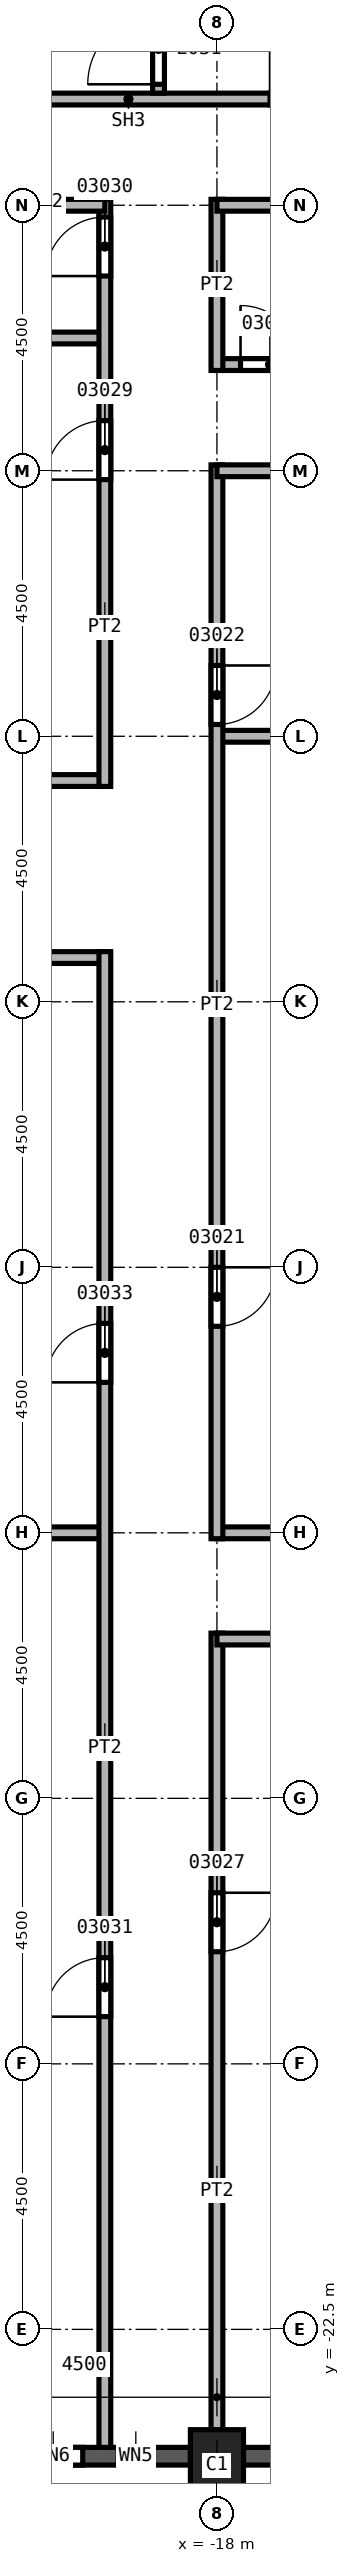
"""IFC4 building model, lengths in metres.
Left out: names, types, materials, properties, quantities, classifications, styles, units other than length and angle.
Written with IfcOpenShell. Run it as: python <this file> out.ifc"""

import sys

from ifc_helpers import new_model, si_unit, direction, frame, frame_2d, origin, origin_2d, place, context, subcontext, project, spatial, rectangle, extrude, element, fill, save


model = new_model("IFC4")
c1 = context("Model", 3, precision=1e-05, world=origin(), true_north=direction((0.0, 1.0)))
c2 = subcontext(c1, "Body", "Model", "MODEL_VIEW")
j1 = project(units=[si_unit("LENGTHUNIT", "METRE"), si_unit("PLANEANGLEUNIT", "RADIAN")], contexts=[c1])
p1 = place(None, origin())
s1 = spatial("IfcSite", under=j1, at=p1, CompositionType="ELEMENT")
p2 = place(p1, origin())
s2 = spatial("IfcBuilding", under=s1, at=p2, CompositionType="ELEMENT")
p3 = place(p2, frame((0.0, 0.0, 92.0)))
s3 = spatial("IfcBuildingStorey", under=s2, at=p3, CompositionType="ELEMENT", Elevation=92.0)
p4 = place(p3, frame((-18.0, -24.8, 0.0), z_axis=(0.0, 0.0, 1.0), x_axis=(1.0, 0.0, 0.0)))
e1 = element("IfcColumn", 1, at=p4, inside=s3, PredefinedType="COLUMN", context=c2, shape_type="SweptSolid", body=[
    extrude(rectangle(XDim=0.9, YDim=1.2, at=origin_2d()), origin(), (0.0, 0.0, 1.0), 3.7),
])
p5 = place(p3, frame((-22.05, -24.65, 0.0), z_axis=(0.0, 0.0, 1.0), x_axis=(1.0, 0.0, 0.0)))
e2 = element("IfcWall", 2, at=p5, inside=s3, PredefinedType="SOLIDWALL", context=c2, shape_type="SweptSolid", body=[
    extrude(rectangle(XDim=3.6, YDim=0.3, at=frame_2d((1.8, 0.0))), origin(), (0.0, 0.0, 1.0), 3.1),
])
p6 = place(p5, frame((0.775, 0.0, 0.8)))
e3 = element("IfcOpeningElement", 3, at=p6, cuts=e2, PredefinedType="OPENING", context=c2, shape_type="SweptSolid", body=[
    extrude(rectangle(XDim=1.0, YDim=1.95, at=frame_2d((0.5, 0.975))), frame((0.0, 0.15, 0.0), z_axis=(0.0, -1.0, 0.0), x_axis=(1.0, 0.0, 0.0)), (0.0, 0.0, 1.0), 0.3),
])
p7 = place(p5, frame((2.375, 0.0, 0.8)))
e4 = element("IfcOpeningElement", 4, at=p7, cuts=e2, PredefinedType="OPENING", context=c2, shape_type="SweptSolid", body=[
    extrude(rectangle(XDim=0.6, YDim=1.95, at=frame_2d((0.3, 0.975))), frame((0.0, 0.15, 0.0), z_axis=(0.0, -1.0, 0.0), x_axis=(1.0, 0.0, 0.0)), (0.0, 0.0, 1.0), 0.3),
])
p8 = place(p3, frame((-17.55, -24.65, 0.0), z_axis=(0.0, 0.0, 1.0), x_axis=(1.0, 0.0, 0.0)))
e5 = element("IfcWall", 5, at=p8, inside=s3, PredefinedType="SOLIDWALL", context=c2, shape_type="SweptSolid", body=[
    extrude(rectangle(XDim=3.6, YDim=0.3, at=frame_2d((1.8, 0.0))), origin(), (0.0, 0.0, 1.0), 3.1),
])
p9 = place(p8, frame((0.6, 0.0, 0.8)))
e6 = element("IfcOpeningElement", 6, at=p9, cuts=e5, PredefinedType="OPENING", context=c2, shape_type="SweptSolid", body=[
    extrude(rectangle(XDim=2.4, YDim=1.95, at=frame_2d((1.2, 0.975))), frame((0.0, 0.15, 0.0), z_axis=(0.0, -1.0, 0.0), x_axis=(1.0, 0.0, 0.0)), (0.0, 0.0, 1.0), 0.3),
])
p10 = place(p3, frame((-33.85, 3.75, 0.0), z_axis=(0.0, 0.0, 1.0), x_axis=(1.0, 0.0, 0.0)))
e7 = element("IfcWall", 7, at=p10, inside=s3, PredefinedType="PARTITIONING", context=c2, shape_type="SweptSolid", body=[
    extrude(rectangle(XDim=13.95, YDim=0.2, at=frame_2d((6.975, 0.0))), origin(), (0.0, 0.0, 1.0), 3.7),
])
p11 = place(p10, frame((5.65, 0.0, 0.0)))
e8 = element("IfcOpeningElement", 8, at=p11, cuts=e7, PredefinedType="OPENING", context=c2, shape_type="SweptSolid", body=[
    extrude(rectangle(XDim=1.0, YDim=2.1, at=frame_2d((0.5, 1.05))), frame((0.0, 0.1, 0.0), z_axis=(0.0, -1.0, 0.0), x_axis=(1.0, 0.0, 0.0)), (0.0, 0.0, 1.0), 0.2),
])
for number, where, z_axis, x_axis in (
    (9, (-27.1, -9.0, 0.0), (0.0, 0.0, 1.0), (1.0, 0.0, 0.0)),
    (10, (-27.1, 11.25, 0.0), (0.0, 0.0, 1.0), (1.0, 0.0, 0.0)),
):
    element("IfcWall", number, at=place(p3, frame(where, z_axis=z_axis, x_axis=x_axis)), inside=s3, PredefinedType="PARTITIONING", context=c2, shape_type="SweptSolid", body=[
        extrude(rectangle(XDim=7.2, YDim=0.2, at=frame_2d((3.6, 0.0))), origin(), (0.0, 0.0, 1.0), 3.7),
    ])
p12 = place(p3, frame((-19.9, 0.75, 0.0), z_axis=(0.0, 0.0, 1.0), x_axis=(-1.0, 0.0, 0.0)))
e11 = element("IfcWall", 11, at=p12, inside=s3, PredefinedType="PARTITIONING", context=c2, shape_type="SweptSolid", body=[
    extrude(rectangle(XDim=13.95, YDim=0.2, at=frame_2d((6.975, 0.0))), origin(), (0.0, 0.0, 1.0), 3.7),
])
p13 = place(p3, frame((-19.9, -24.5, 0.0), z_axis=(0.0, 0.0, 1.0), x_axis=(0.0, 1.0, 0.0)))
e12 = element("IfcWall", 12, at=p13, inside=s3, PredefinedType="PARTITIONING", context=c2, shape_type="SweptSolid", body=[
    extrude(rectangle(XDim=25.35, YDim=0.2, at=frame_2d((12.675, 0.0))), origin(), (0.0, 0.0, 1.0), 3.7),
])
p14 = place(p13, frame((7.3, 0.0, 0.0)))
e13 = element("IfcOpeningElement", 13, at=p14, cuts=e12, PredefinedType="OPENING", context=c2, shape_type="SweptSolid", body=[
    extrude(rectangle(XDim=1.0, YDim=2.1, at=frame_2d((0.5, 1.05))), frame((0.0, 0.1, 0.0), z_axis=(0.0, -1.0, 0.0), x_axis=(1.0, 0.0, 0.0)), (0.0, 0.0, 1.0), 0.2),
])
p15 = place(p13, frame((18.05, 0.0, 0.0)))
e14 = element("IfcOpeningElement", 14, at=p15, cuts=e12, PredefinedType="OPENING", context=c2, shape_type="SweptSolid", body=[
    extrude(rectangle(XDim=1.0, YDim=2.1, at=frame_2d((0.5, 1.05))), frame((0.0, 0.1, 0.0), z_axis=(0.0, -1.0, 0.0), x_axis=(1.0, 0.0, 0.0)), (0.0, 0.0, 1.0), 0.2),
])
p16 = place(p3, frame((-19.9, 3.65, 0.0), z_axis=(0.0, 0.0, 1.0), x_axis=(0.0, 1.0, 0.0)))
e15 = element("IfcWall", 15, at=p16, inside=s3, PredefinedType="PARTITIONING", context=c2, shape_type="SweptSolid", body=[
    extrude(rectangle(XDim=9.95, YDim=0.2, at=frame_2d((4.975, 0.0))), origin(), (0.0, 0.0, 1.0), 3.7),
])
p17 = place(p16, frame((5.2, 0.0, 0.0)))
e16 = element("IfcOpeningElement", 16, at=p17, cuts=e15, PredefinedType="OPENING", context=c2, shape_type="SweptSolid", body=[
    extrude(rectangle(XDim=1.0, YDim=2.1, at=frame_2d((0.5, 1.05))), frame((0.0, 0.1, 0.0), z_axis=(0.0, -1.0, 0.0), x_axis=(1.0, 0.0, 0.0)), (0.0, 0.0, 1.0), 0.2),
])
p18 = place(p16, frame((8.65, 0.0, 0.0)))
e17 = element("IfcOpeningElement", 17, at=p18, cuts=e15, PredefinedType="OPENING", context=c2, shape_type="SweptSolid", body=[
    extrude(rectangle(XDim=1.0, YDim=2.1, at=frame_2d((0.5, 1.05))), frame((0.0, 0.1, 0.0), z_axis=(0.0, -1.0, 0.0), x_axis=(1.0, 0.0, 0.0)), (0.0, 0.0, 1.0), 0.2),
])
p19 = place(p3, frame((-19.9, 13.5, 0.0), z_axis=(0.0, 0.0, 1.0), x_axis=(-1.0, 0.0, 0.0)))
e18 = element("IfcWall", 18, at=p19, inside=s3, PredefinedType="PARTITIONING", context=c2, shape_type="SweptSolid", body=[
    extrude(rectangle(XDim=2.1, YDim=0.2, at=frame_2d((1.05, 0.0))), origin(), (0.0, 0.0, 1.0), 3.7),
])
p20 = place(p3, frame((-18.0, -10.7, 0.0), z_axis=(0.0, 0.0, 1.0), x_axis=(0.0, -1.0, 0.0)))
e19 = element("IfcWall", 19, at=p20, inside=s3, PredefinedType="PARTITIONING", context=c2, shape_type="SweptSolid", body=[
    extrude(rectangle(XDim=13.5, YDim=0.2, at=frame_2d((6.75, 0.0))), origin(), (0.0, 0.0, 1.0), 3.7),
])
p21 = place(p20, frame((4.4, 0.0, 0.0)))
e20 = element("IfcOpeningElement", 20, at=p21, cuts=e19, PredefinedType="OPENING", context=c2, shape_type="SweptSolid", body=[
    extrude(rectangle(XDim=1.0, YDim=2.1, at=frame_2d((0.5, 1.05))), frame((0.0, 0.1, 0.0), z_axis=(0.0, -1.0, 0.0), x_axis=(1.0, 0.0, 0.0)), (0.0, 0.0, 1.0), 0.2),
])
for number, where, z_axis, x_axis in (
    (21, (-18.0, -9.0, 0.0), (0.0, 0.0, 1.0), (1.0, 0.0, 0.0)),
    (22, (-18.0, 4.5, 0.0), (0.0, 0.0, 1.0), (1.0, 0.0, 0.0)),
):
    element("IfcWall", number, at=place(p3, frame(where, z_axis=z_axis, x_axis=x_axis)), inside=s3, PredefinedType="PARTITIONING", context=c2, shape_type="SweptSolid", body=[
        extrude(rectangle(XDim=4.5, YDim=0.2, at=frame_2d((2.25, 0.0))), origin(), (0.0, 0.0, 1.0), 3.7),
    ])
p22 = place(p3, frame((-18.0, 9.1, 0.0), z_axis=(0.0, 0.0, 1.0), x_axis=(0.0, -1.0, 0.0)))
e23 = element("IfcWall", 23, at=p22, inside=s3, PredefinedType="PARTITIONING", context=c2, shape_type="SweptSolid", body=[
    extrude(rectangle(XDim=18.2, YDim=0.2, at=frame_2d((9.1, 0.0))), origin(), (0.0, 0.0, 1.0), 3.7),
])
p23 = place(p22, frame((13.6, 0.0, 0.0)))
e24 = element("IfcOpeningElement", 24, at=p23, cuts=e23, PredefinedType="OPENING", context=c2, shape_type="SweptSolid", body=[
    extrude(rectangle(XDim=1.0, YDim=2.1, at=frame_2d((0.5, 1.05))), frame((0.0, 0.1, 0.0), z_axis=(0.0, -1.0, 0.0), x_axis=(1.0, 0.0, 0.0)), (0.0, 0.0, 1.0), 0.2),
])
p24 = place(p22, frame((3.4, 0.0, 0.0)))
e25 = element("IfcOpeningElement", 25, at=p24, cuts=e23, PredefinedType="OPENING", context=c2, shape_type="SweptSolid", body=[
    extrude(rectangle(XDim=1.0, YDim=2.1, at=frame_2d((0.5, 1.05))), frame((0.0, 0.1, 0.0), z_axis=(0.0, -1.0, 0.0), x_axis=(1.0, 0.0, 0.0)), (0.0, 0.0, 1.0), 0.2),
])
p25 = place(p3, frame((-18.0, 10.8, 0.0), z_axis=(0.0, 0.0, 1.0), x_axis=(1.0, 0.0, 0.0)))
e26 = element("IfcWall", 26, at=p25, inside=s3, PredefinedType="PARTITIONING", context=c2, shape_type="SweptSolid", body=[
    extrude(rectangle(XDim=3.6, YDim=0.2, at=frame_2d((1.8, 0.0))), origin(), (0.0, 0.0, 1.0), 3.7),
])
p26 = place(p25, frame((0.4, 0.0, 0.0)))
e27 = element("IfcOpeningElement", 27, at=p26, cuts=e26, PredefinedType="OPENING", context=c2, shape_type="SweptSolid", body=[
    extrude(rectangle(XDim=1.0, YDim=2.1, at=frame_2d((0.5, 1.05))), frame((0.0, 0.1, 0.0), z_axis=(0.0, -1.0, 0.0), x_axis=(1.0, 0.0, 0.0)), (0.0, 0.0, 1.0), 0.2),
])
p27 = place(p3, frame((-18.0, 13.6, 0.0), z_axis=(0.0, 0.0, 1.0), x_axis=(0.0, -1.0, 0.0)))
e28 = element("IfcWall", 28, at=p27, inside=s3, PredefinedType="PARTITIONING", context=c2, shape_type="SweptSolid", body=[
    extrude(rectangle(XDim=2.9, YDim=0.2, at=frame_2d((1.45, 0.0))), origin(), (0.0, 0.0, 1.0), 3.7),
])
p28 = place(p3, frame((-15.3, 13.5, 0.0), z_axis=(0.0, 0.0, 1.0), x_axis=(-1.0, 0.0, 0.0)))
e29 = element("IfcWall", 29, at=p28, inside=s3, PredefinedType="PARTITIONING", context=c2, shape_type="SweptSolid", body=[
    extrude(rectangle(XDim=2.7, YDim=0.2, at=frame_2d((1.35, 0.0))), origin(), (0.0, 0.0, 1.0), 3.7),
])
p29 = place(p3, frame((-14.4, -10.8, 0.0), z_axis=(0.0, 0.0, 1.0), x_axis=(-1.0, 0.0, 0.0)))
e30 = element("IfcWall", 30, at=p29, inside=s3, PredefinedType="PARTITIONING", context=c2, shape_type="SweptSolid", body=[
    extrude(rectangle(XDim=3.6, YDim=0.2, at=frame_2d((1.8, 0.0))), origin(), (0.0, 0.0, 1.0), 3.7),
])
p30 = place(p3, frame((-13.5, 9.0, 0.0), z_axis=(0.0, 0.0, 1.0), x_axis=(-1.0, 0.0, 0.0)))
e31 = element("IfcWall", 31, at=p30, inside=s3, PredefinedType="PARTITIONING", context=c2, shape_type="SweptSolid", body=[
    extrude(rectangle(XDim=4.5, YDim=0.2, at=frame_2d((2.25, 0.0))), origin(), (0.0, 0.0, 1.0), 3.7),
])
p31 = place(p3, frame((-21.9, 15.3, 0.0), z_axis=(0.0, 0.0, 1.0), x_axis=(1.0, 0.0, 0.0)))
e32 = element("IfcWall", 32, at=p31, inside=s3, PredefinedType="SOLIDWALL", context=c2, shape_type="SweptSolid", body=[
    extrude(rectangle(XDim=8.275, YDim=0.2, at=frame_2d((4.137, 0.0))), origin(), (0.0, 0.0, 1.0), 3.7),
])
p32 = place(p31, frame((4.8, 0.0, 0.0)))
e33 = element("IfcOpeningElement", 33, at=p32, cuts=e32, PredefinedType="OPENING", context=c2, shape_type="SweptSolid", body=[
    extrude(rectangle(XDim=1.2, YDim=2.1, at=frame_2d((0.6, 1.05))), frame((0.0, 0.1, 0.0), z_axis=(0.0, -1.0, 0.0), x_axis=(1.0, 0.0, 0.0)), (0.0, 0.0, 1.0), 0.2),
])
p33 = place(p3, frame((-18.99, 15.4, 0.0), z_axis=(0.0, 0.0, 1.0), x_axis=(0.0, 1.0, 0.0)))
e34 = element("IfcWall", 34, at=p33, inside=s3, PredefinedType="SOLIDWALL", context=c2, shape_type="SweptSolid", body=[
    extrude(rectangle(XDim=5.9, YDim=0.2, at=frame_2d((2.95, 0.0))), origin(), (0.0, 0.0, 1.0), 3.7),
])
p34 = place(p33, frame((0.15, 0.0, 0.0)))
e35 = element("IfcOpeningElement", 35, at=p34, cuts=e34, PredefinedType="OPENING", context=c2, shape_type="SweptSolid", body=[
    extrude(rectangle(XDim=1.2, YDim=2.1, at=frame_2d((0.6, 1.05))), frame((0.0, 0.1, 0.0), z_axis=(0.0, -1.0, 0.0), x_axis=(1.0, 0.0, 0.0)), (0.0, 0.0, 1.0), 0.2),
])
p35 = place(p23, origin())
e36 = element("IfcDoor", 36, at=p35, inside=s3, OperationType="SINGLE_SWING_RIGHT", PredefinedType="DOOR", context=c2, shape_type="SweptSolid", body=[
    extrude(rectangle(XDim=1.0, YDim=2.1, at=frame_2d((0.5, 1.05))), frame((0.0, 0.025, 0.0), z_axis=(0.0, -1.0, 0.0), x_axis=(1.0, 0.0, 0.0)), (0.0, 0.0, 1.0), 0.05),
])
fill(e24, e36)
p36 = place(p24, origin())
e37 = element("IfcDoor", 37, at=p36, inside=s3, OperationType="SINGLE_SWING_LEFT", PredefinedType="DOOR", context=c2, shape_type="SweptSolid", body=[
    extrude(rectangle(XDim=1.0, YDim=2.1, at=frame_2d((0.5, 1.05))), frame((0.0, 0.025, 0.0), z_axis=(0.0, -1.0, 0.0), x_axis=(1.0, 0.0, 0.0)), (0.0, 0.0, 1.0), 0.05),
])
fill(e25, e37)
p37 = place(p26, origin())
e38 = element("IfcDoor", 38, at=p37, inside=s3, OperationType="SINGLE_SWING_RIGHT", PredefinedType="DOOR", context=c2, shape_type="SweptSolid", body=[
    extrude(rectangle(XDim=1.0, YDim=2.1, at=frame_2d((0.5, 1.05))), frame((0.0, 0.025, 0.0), z_axis=(0.0, -1.0, 0.0), x_axis=(1.0, 0.0, 0.0)), (0.0, 0.0, 1.0), 0.05),
])
fill(e27, e38)
p38 = place(p21, origin())
e39 = element("IfcDoor", 39, at=p38, inside=s3, OperationType="SINGLE_SWING_RIGHT", PredefinedType="DOOR", context=c2, shape_type="SweptSolid", body=[
    extrude(rectangle(XDim=1.0, YDim=2.1, at=frame_2d((0.5, 1.05))), frame((0.0, 0.025, 0.0), z_axis=(0.0, -1.0, 0.0), x_axis=(1.0, 0.0, 0.0)), (0.0, 0.0, 1.0), 0.05),
])
fill(e20, e39)
p39 = place(p17, origin())
e40 = element("IfcDoor", 40, at=p39, inside=s3, OperationType="SINGLE_SWING_RIGHT", PredefinedType="DOOR", context=c2, shape_type="SweptSolid", body=[
    extrude(rectangle(XDim=1.0, YDim=2.1, at=frame_2d((0.5, 1.05))), frame((0.0, 0.025, 0.0), z_axis=(0.0, -1.0, 0.0), x_axis=(1.0, 0.0, 0.0)), (0.0, 0.0, 1.0), 0.05),
])
fill(e16, e40)
p40 = place(p18, origin())
e41 = element("IfcDoor", 41, at=p40, inside=s3, OperationType="SINGLE_SWING_LEFT", PredefinedType="DOOR", context=c2, shape_type="SweptSolid", body=[
    extrude(rectangle(XDim=1.0, YDim=2.1, at=frame_2d((0.5, 1.05))), frame((0.0, 0.025, 0.0), z_axis=(0.0, -1.0, 0.0), x_axis=(1.0, 0.0, 0.0)), (0.0, 0.0, 1.0), 0.05),
])
fill(e17, e41)
p41 = place(p14, origin())
e42 = element("IfcDoor", 42, at=p41, inside=s3, OperationType="SINGLE_SWING_RIGHT", PredefinedType="DOOR", context=c2, shape_type="SweptSolid", body=[
    extrude(rectangle(XDim=1.0, YDim=2.1, at=frame_2d((0.5, 1.05))), frame((0.0, 0.025, 0.0), z_axis=(0.0, -1.0, 0.0), x_axis=(1.0, 0.0, 0.0)), (0.0, 0.0, 1.0), 0.05),
])
fill(e13, e42)
p42 = place(p15, origin())
e43 = element("IfcDoor", 43, at=p42, inside=s3, OperationType="SINGLE_SWING_RIGHT", PredefinedType="DOOR", context=c2, shape_type="SweptSolid", body=[
    extrude(rectangle(XDim=1.0, YDim=2.1, at=frame_2d((0.5, 1.05))), frame((0.0, 0.025, 0.0), z_axis=(0.0, -1.0, 0.0), x_axis=(1.0, 0.0, 0.0)), (0.0, 0.0, 1.0), 0.05),
])
fill(e14, e43)
p43 = place(p34, origin())
e44 = element("IfcDoor", 44, at=p43, inside=s3, OperationType="SINGLE_SWING_LEFT", PredefinedType="DOOR", context=c2, shape_type="SweptSolid", body=[
    extrude(rectangle(XDim=1.2, YDim=2.1, at=frame_2d((0.6, 1.05))), frame((0.0, 0.025, 0.0), z_axis=(0.0, -1.0, 0.0), x_axis=(1.0, 0.0, 0.0)), (0.0, 0.0, 1.0), 0.05),
])
fill(e35, e44)
p44 = place(p6, origin())
e45 = element("IfcWindow", 45, at=p44, inside=s3, PartitioningType="SINGLE_PANEL", PredefinedType="WINDOW", context=c2, shape_type="SweptSolid", body=[
    extrude(rectangle(XDim=1.0, YDim=1.95, at=frame_2d((0.5, 0.975))), frame((0.0, 0.03, 0.0), z_axis=(0.0, -1.0, 0.0), x_axis=(1.0, 0.0, 0.0)), (0.0, 0.0, 1.0), 0.06),
])
fill(e3, e45)
p45 = place(p7, origin())
e46 = element("IfcWindow", 46, at=p45, inside=s3, PartitioningType="SINGLE_PANEL", PredefinedType="WINDOW", context=c2, shape_type="SweptSolid", body=[
    extrude(rectangle(XDim=0.6, YDim=1.95, at=frame_2d((0.3, 0.975))), frame((0.0, 0.03, 0.0), z_axis=(0.0, -1.0, 0.0), x_axis=(1.0, 0.0, 0.0)), (0.0, 0.0, 1.0), 0.06),
])
fill(e4, e46)
save(model, sys.argv[1])
